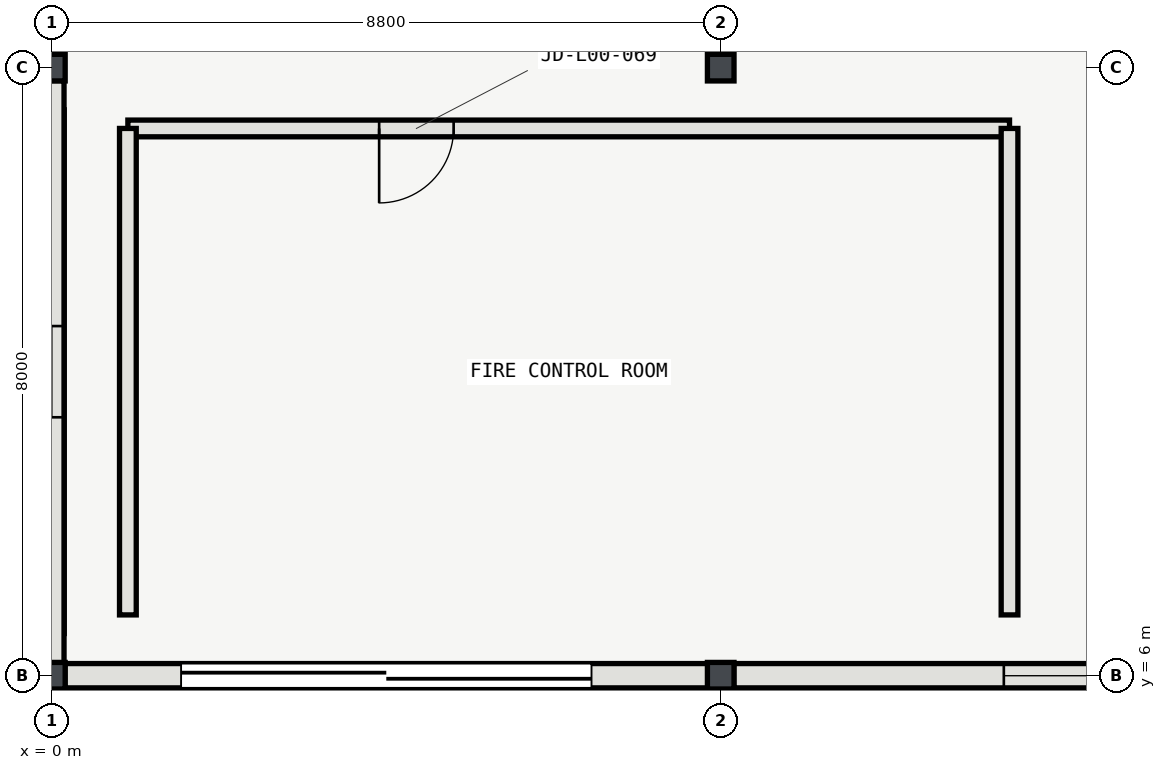
"""IFC4 building model, lengths in metres.
Left out: names, types, materials, properties, quantities, classifications, styles, units other than length and angle.
Written with IfcOpenShell. Run it as: python <this file> out.ifc"""

import sys

from ifc_helpers import new_model, si_unit, direction, frame, frame_2d, origin, origin_2d, place, context, subcontext, project, spatial, rectangle, i_section, extrude, element, fill, save


model = new_model("IFC4")
c1 = context("Model", 3, precision=1e-05, world=origin(), true_north=direction((0.0, 1.0)))
c2 = subcontext(c1, "Body", "Model", "MODEL_VIEW")
j1 = project(units=[si_unit("LENGTHUNIT", "METRE"), si_unit("PLANEANGLEUNIT", "RADIAN")], contexts=[c1])
p1 = place(None, origin())
s1 = spatial("IfcSite", under=j1, at=p1, CompositionType="ELEMENT")
p2 = place(p1, origin())
s2 = spatial("IfcBuilding", under=s1, at=p2, CompositionType="ELEMENT")
p3 = place(p2, origin())
s3 = spatial("IfcBuildingStorey", under=s2, at=p3, CompositionType="ELEMENT", Elevation=0.0)
for number, where, z_axis, x_axis in (
    (1, (0.0, 6.0, 0.0), (0.0, 0.0, 1.0), (1.0, 0.0, 0.0)),
    (2, (0.0, 14.0, 0.0), (0.0, 0.0, 1.0), (1.0, 0.0, 0.0)),
    (3, (8.8, 6.0, 0.0), (0.0, 0.0, 1.0), (1.0, 0.0, 0.0)),
    (4, (8.8, 14.0, 0.0), (0.0, 0.0, 1.0), (1.0, 0.0, 0.0)),
):
    element("IfcColumn", number, at=place(p3, frame(where, z_axis=z_axis, x_axis=x_axis)), inside=s3, PredefinedType="COLUMN", context=c2, shape_type="SweptSolid", body=[
        extrude(i_section(OverallWidth=0.35, OverallDepth=0.35, WebThickness=0.012, FlangeThickness=0.019, FilletRadius=0.02, at=origin_2d()), origin(), (0.0, 0.0, 1.0), 5.4),
    ])
p4 = place(p3, frame((0.171, 6.0, 0.0), z_axis=(0.0, 0.0, 1.0), x_axis=(1.0, 0.0, 0.0)))
e5 = element("IfcWall", 5, at=p4, inside=s3, PredefinedType="SOLIDWALL", context=c2, shape_type="SweptSolid", body=[
    extrude(rectangle(XDim=8.458, YDim=0.32, at=frame_2d((4.229, 0.0))), origin(), (0.0, 0.0, 1.0), 4.635),
])
p5 = place(p4, frame((1.529, 0.0, 0.0)))
e6 = element("IfcOpeningElement", 6, at=p5, cuts=e5, PredefinedType="OPENING", context=c2, shape_type="SweptSolid", body=[
    extrude(rectangle(XDim=5.4, YDim=3.8, at=frame_2d((2.7, 1.9))), frame((0.0, 0.17, 0.0), z_axis=(0.0, -1.0, 0.0), x_axis=(1.0, 0.0, 0.0)), (0.0, 0.0, 1.0), 0.34),
])
p6 = place(p3, frame((8.971, 6.0, 0.0), z_axis=(0.0, 0.0, 1.0), x_axis=(1.0, 0.0, 0.0)))
e7 = element("IfcWall", 7, at=p6, inside=s3, PredefinedType="SOLIDWALL", context=c2, shape_type="SweptSolid", body=[
    extrude(rectangle(XDim=8.458, YDim=0.32, at=frame_2d((4.229, 0.0))), origin(), (0.0, 0.0, 1.0), 4.635),
])
p7 = place(p6, frame((3.554, 0.0, 0.95)))
e8 = element("IfcOpeningElement", 8, at=p7, cuts=e7, PredefinedType="OPENING", context=c2, shape_type="SweptSolid", body=[
    extrude(rectangle(XDim=1.35, YDim=1.8, at=frame_2d((0.675, 0.9))), frame((0.0, 0.17, 0.0), z_axis=(0.0, -1.0, 0.0), x_axis=(1.0, 0.0, 0.0)), (0.0, 0.0, 1.0), 0.34),
])
p8 = place(p3, frame((0.0, 13.829, 0.0), z_axis=(0.0, 0.0, 1.0), x_axis=(0.0, -1.0, 0.0)))
e9 = element("IfcWall", 9, at=p8, inside=s3, PredefinedType="SOLIDWALL", context=c2, shape_type="SweptSolid", body=[
    extrude(rectangle(XDim=7.658, YDim=0.32, at=frame_2d((3.829, 0.0))), origin(), (0.0, 0.0, 1.0), 4.523),
])
p9 = place(p8, frame((3.229, 0.0, 0.95)))
e10 = element("IfcOpeningElement", 10, at=p9, cuts=e9, PredefinedType="OPENING", context=c2, shape_type="SweptSolid", body=[
    extrude(rectangle(XDim=1.2, YDim=2.1, at=frame_2d((0.6, 1.05))), frame((0.0, 0.17, 0.0), z_axis=(0.0, -1.0, 0.0), x_axis=(1.0, 0.0, 0.0)), (0.0, 0.0, 1.0), 0.34),
])
p10 = place(p3, frame((0.0, 21.829, 0.0), z_axis=(0.0, 0.0, 1.0), x_axis=(0.0, -1.0, 0.0)))
e11 = element("IfcWall", 11, at=p10, inside=s3, PredefinedType="SOLIDWALL", context=c2, shape_type="SweptSolid", body=[
    extrude(rectangle(XDim=7.658, YDim=0.32, at=frame_2d((3.829, 0.0))), origin(), (0.0, 0.0, 1.0), 4.523),
])
p11 = place(p10, frame((3.154, 0.0, 0.95)))
e12 = element("IfcOpeningElement", 12, at=p11, cuts=e11, PredefinedType="OPENING", context=c2, shape_type="SweptSolid", body=[
    extrude(rectangle(XDim=1.35, YDim=2.1, at=frame_2d((0.675, 1.05))), frame((0.0, 0.17, 0.0), z_axis=(0.0, -1.0, 0.0), x_axis=(1.0, 0.0, 0.0)), (0.0, 0.0, 1.0), 0.34),
])
p12 = place(p3, frame((12.6, 13.2, 0.0), z_axis=(0.0, 0.0, 1.0), x_axis=(-1.0, 0.0, 0.0)))
e13 = element("IfcWall", 13, at=p12, inside=s3, PredefinedType="PARTITIONING", context=c2, shape_type="SweptSolid", body=[
    extrude(rectangle(XDim=11.6, YDim=0.22, at=frame_2d((5.8, 0.0))), origin(), (0.0, 0.0, 1.0), 5.12),
])
p13 = place(p12, frame((7.314, 0.0, 0.0)))
e14 = element("IfcOpeningElement", 14, at=p13, cuts=e13, PredefinedType="OPENING", context=c2, shape_type="SweptSolid", body=[
    extrude(rectangle(XDim=0.98, YDim=2.2, at=frame_2d((0.49, 1.1))), frame((0.0, 0.12, 0.0), z_axis=(0.0, -1.0, 0.0), x_axis=(1.0, 0.0, 0.0)), (0.0, 0.0, 1.0), 0.24),
])
for number, where, z_axis, x_axis in (
    (15, (1.0, 13.2, 0.0), (0.0, 0.0, 1.0), (0.0, -1.0, 0.0)),
    (16, (12.6, 6.8, 0.0), (0.0, 0.0, 1.0), (0.0, 1.0, 0.0)),
):
    element("IfcWall", number, at=place(p3, frame(where, z_axis=z_axis, x_axis=x_axis)), inside=s3, PredefinedType="PARTITIONING", context=c2, shape_type="SweptSolid", body=[
        extrude(rectangle(XDim=6.4, YDim=0.22, at=frame_2d((3.2, 0.0))), origin(), (0.0, 0.0, 1.0), 5.12),
    ])
p14 = place(p5, origin())
e17 = element("IfcDoor", 17, at=p14, inside=s3, OperationType="ROLLINGUP", PredefinedType="GATE", context=c2, shape_type="SweptSolid", body=[
    extrude(rectangle(XDim=5.4, YDim=3.8, at=frame_2d((2.7, 1.9))), frame((0.0, 0.025, 0.0), z_axis=(0.0, -1.0, 0.0), x_axis=(1.0, 0.0, 0.0)), (0.0, 0.0, 1.0), 0.05),
])
fill(e6, e17)
p15 = place(p7, origin())
e18 = element("IfcWindow", 18, at=p15, inside=s3, PartitioningType="SINGLE_PANEL", PredefinedType="WINDOW", context=c2, shape_type="SweptSolid", body=[
    extrude(rectangle(XDim=1.35, YDim=1.8, at=frame_2d((0.675, 0.9))), frame((0.0, 0.03, 0.0), z_axis=(0.0, -1.0, 0.0), x_axis=(1.0, 0.0, 0.0)), (0.0, 0.0, 1.0), 0.06),
])
fill(e8, e18)
p16 = place(p9, origin())
e19 = element("IfcWindow", 19, at=p16, inside=s3, PartitioningType="SINGLE_PANEL", PredefinedType="WINDOW", context=c2, shape_type="SweptSolid", body=[
    extrude(rectangle(XDim=1.2, YDim=2.1, at=frame_2d((0.6, 1.05))), frame((0.0, 0.03, 0.0), z_axis=(0.0, -1.0, 0.0), x_axis=(1.0, 0.0, 0.0)), (0.0, 0.0, 1.0), 0.06),
])
fill(e10, e19)
p17 = place(p13, origin())
e20 = element("IfcDoor", 20, at=p17, inside=s3, OperationType="SINGLE_SWING_RIGHT", PredefinedType="DOOR", context=c2, shape_type="SweptSolid", body=[
    extrude(rectangle(XDim=0.98, YDim=2.2, at=frame_2d((0.49, 1.1))), frame((0.0, 0.025, 0.0), z_axis=(0.0, -1.0, 0.0), x_axis=(1.0, 0.0, 0.0)), (0.0, 0.0, 1.0), 0.05),
])
fill(e14, e20)
save(model, sys.argv[1])
